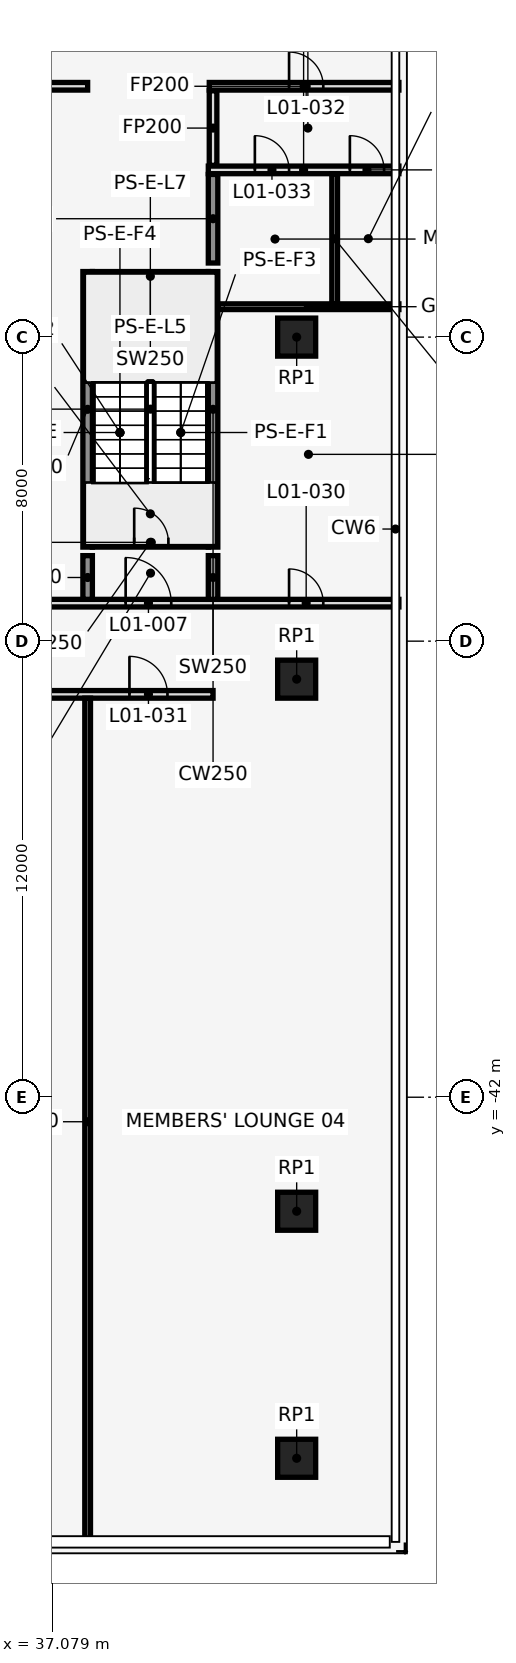
"""IFC4 building model, lengths in metres.
Left out: names, types, materials, properties, quantities, classifications, styles, units other than length and angle.
Written with IfcOpenShell. Run it as: python <this file> out.ifc"""

import sys

from ifc_helpers import new_model, si_unit, direction, frame, frame_2d, origin, origin_2d, place, context, subcontext, project, spatial, rectangle, extrude, element, fill, save


model = new_model("IFC4")
c1 = context("Model", 3, precision=1e-05, world=origin(), true_north=direction((0.0, 1.0)))
c2 = subcontext(c1, "Body", "Model", "MODEL_VIEW")
j1 = project(units=[si_unit("LENGTHUNIT", "METRE"), si_unit("PLANEANGLEUNIT", "RADIAN")], contexts=[c1])
p1 = place(None, origin())
s1 = spatial("IfcSite", under=j1, at=p1, CompositionType="ELEMENT")
p2 = place(p1, origin())
s2 = spatial("IfcBuilding", under=s1, at=p2, CompositionType="ELEMENT")
p3 = place(p2, frame((0.0, 0.0, 8.0)))
s3 = spatial("IfcBuildingStorey", under=s2, at=p3, CompositionType="ELEMENT", Elevation=8.0)
for number, where, z_axis, x_axis in (
    (1, (43.5, -22.0, 0.0), (0.0, 0.0, 1.0), (1.0, 0.0, 0.0)),
    (2, (43.5, -31.0, 0.0), (0.0, 0.0, 1.0), (1.0, 0.0, 0.0)),
    (3, (43.5, -45.0, 0.0), (0.0, 0.0, 1.0), (1.0, 0.0, 0.0)),
    (4, (43.5, -51.5, 0.0), (0.0, 0.0, 1.0), (1.0, 0.0, 0.0)),
):
    element("IfcColumn", number, at=place(p3, frame(where, z_axis=z_axis, x_axis=x_axis)), inside=s3, PredefinedType="COLUMN", context=c2, shape_type="SweptSolid", body=[
        extrude(rectangle(XDim=1.0, YDim=1.0, at=origin_2d()), origin(), (0.0, 0.0, 1.0), 6.0),
    ])
for number, where, z_axis, x_axis in (
    (5, (38.0, -27.525, 0.0), (0.0, 0.0, 1.0), (0.0, 1.0, 0.0)),
    (6, (41.3, -27.525, 0.0), (0.0, 0.0, 1.0), (0.0, 1.0, 0.0)),
):
    element("IfcWall", number, at=place(p3, frame(where, z_axis=z_axis, x_axis=x_axis)), inside=s3, PredefinedType="SHEAR", context=c2, shape_type="SweptSolid", body=[
        extrude(rectangle(XDim=7.25, YDim=0.25, at=frame_2d((3.625, 0.0))), origin(), (0.0, 0.0, 1.0), 6.0),
    ])
p4 = place(p3, frame((38.125, -27.4, 0.0), z_axis=(0.0, 0.0, 1.0), x_axis=(1.0, 0.0, 0.0)))
e7 = element("IfcWall", 7, at=p4, inside=s3, PredefinedType="SHEAR", context=c2, shape_type="SweptSolid", body=[
    extrude(rectangle(XDim=3.05, YDim=0.25, at=frame_2d((1.525, 0.0))), origin(), (0.0, 0.0, 1.0), 6.0),
])
p5 = place(p4, frame((1.1, 0.0, 0.0)))
e8 = element("IfcOpeningElement", 8, at=p5, cuts=e7, PredefinedType="OPENING", context=c2, shape_type="SweptSolid", body=[
    extrude(rectangle(XDim=0.9, YDim=2.1, at=frame_2d((0.45, 1.05))), frame((0.0, 0.137, 0.0), z_axis=(0.0, -1.0, 0.0), x_axis=(1.0, 0.0, 0.0)), (0.0, 0.0, 1.0), 0.274),
])
p6 = place(p3, frame((38.125, -20.4, 0.0), z_axis=(0.0, 0.0, 1.0), x_axis=(1.0, 0.0, 0.0)))
e9 = element("IfcWall", 9, at=p6, inside=s3, PredefinedType="SHEAR", context=c2, shape_type="SweptSolid", body=[
    extrude(rectangle(XDim=3.05, YDim=0.25, at=frame_2d((1.525, 0.0))), origin(), (0.0, 0.0, 1.0), 6.0),
])
p7 = place(p3, frame((19.6, -31.4, 0.0), z_axis=(0.0, 0.0, 1.0), x_axis=(1.0, 0.0, 0.0)))
e10 = element("IfcWall", 10, at=p7, inside=s3, PredefinedType="PARTITIONING", context=c2, shape_type="SweptSolid", body=[
    extrude(rectangle(XDim=21.7, YDim=0.2, at=frame_2d((10.85, 0.0))), origin(), (0.0, 0.0, 1.0), 5.7),
])
p8 = place(p7, frame((1.3, 0.0, 0.0)))
e11 = element("IfcOpeningElement", 11, at=p8, cuts=e10, PredefinedType="OPENING", context=c2, shape_type="SweptSolid", body=[
    extrude(rectangle(XDim=1.0, YDim=2.1, at=frame_2d((0.5, 1.05))), frame((0.0, 0.112, 0.0), z_axis=(0.0, -1.0, 0.0), x_axis=(1.0, 0.0, 0.0)), (0.0, 0.0, 1.0), 0.224),
])
p9 = place(p7, frame((10.4, 0.0, 0.0)))
e12 = element("IfcOpeningElement", 12, at=p9, cuts=e10, PredefinedType="OPENING", context=c2, shape_type="SweptSolid", body=[
    extrude(rectangle(XDim=1.0, YDim=2.1, at=frame_2d((0.5, 1.05))), frame((0.0, 0.112, 0.0), z_axis=(0.0, -1.0, 0.0), x_axis=(1.0, 0.0, 0.0)), (0.0, 0.0, 1.0), 0.224),
])
p10 = place(p7, frame((19.5, 0.0, 0.0)))
e13 = element("IfcOpeningElement", 13, at=p10, cuts=e10, PredefinedType="OPENING", context=c2, shape_type="SweptSolid", body=[
    extrude(rectangle(XDim=1.0, YDim=2.1, at=frame_2d((0.5, 1.05))), frame((0.0, 0.112, 0.0), z_axis=(0.0, -1.0, 0.0), x_axis=(1.0, 0.0, 0.0)), (0.0, 0.0, 1.0), 0.224),
])
p11 = place(p3, frame((19.575, -29.0, 0.0), z_axis=(0.0, 0.0, 1.0), x_axis=(1.0, 0.0, 0.0)))
e14 = element("IfcWall", 14, at=p11, inside=s3, PredefinedType="PARTITIONING", context=c2, shape_type="SweptSolid", body=[
    extrude(rectangle(XDim=26.615, YDim=0.2, at=frame_2d((13.308, 0.0))), origin(), (0.0, 0.0, 1.0), 5.7),
])
p12 = place(p11, frame((1.225, 0.0, 0.0)))
e15 = element("IfcOpeningElement", 15, at=p12, cuts=e14, PredefinedType="OPENING", context=c2, shape_type="SweptSolid", body=[
    extrude(rectangle(XDim=1.2, YDim=2.1, at=frame_2d((0.6, 1.05))), frame((0.0, 0.112, 0.0), z_axis=(0.0, -1.0, 0.0), x_axis=(1.0, 0.0, 0.0)), (0.0, 0.0, 1.0), 0.224),
])
p13 = place(p11, frame((19.425, 0.0, 0.0)))
e16 = element("IfcOpeningElement", 16, at=p13, cuts=e14, PredefinedType="OPENING", context=c2, shape_type="SweptSolid", body=[
    extrude(rectangle(XDim=1.2, YDim=2.1, at=frame_2d((0.6, 1.05))), frame((0.0, 0.112, 0.0), z_axis=(0.0, -1.0, 0.0), x_axis=(1.0, 0.0, 0.0)), (0.0, 0.0, 1.0), 0.224),
])
p14 = place(p11, frame((23.725, 0.0, 0.0)))
e17 = element("IfcOpeningElement", 17, at=p14, cuts=e14, PredefinedType="OPENING", context=c2, shape_type="SweptSolid", body=[
    extrude(rectangle(XDim=0.9, YDim=2.1, at=frame_2d((0.45, 1.05))), frame((0.0, 0.112, 0.0), z_axis=(0.0, -1.0, 0.0), x_axis=(1.0, 0.0, 0.0)), (0.0, 0.0, 1.0), 0.224),
])
p15 = place(p3, frame((41.425, -21.2, 0.0), z_axis=(0.0, 0.0, 1.0), x_axis=(1.0, 0.0, 0.0)))
e18 = element("IfcWall", 18, at=p15, inside=s3, PredefinedType="PARTITIONING", context=c2, shape_type="SweptSolid", body=[
    extrude(rectangle(XDim=4.765, YDim=0.15, at=frame_2d((2.382, 0.0))), origin(), (0.0, 0.0, 1.0), 5.7),
])
p16 = place(p3, frame((41.175, -17.6, 0.0), z_axis=(0.0, 0.0, 1.0), x_axis=(1.0, 0.0, 0.0)))
e19 = element("IfcWall", 19, at=p16, inside=s3, PredefinedType="PARTITIONING", context=c2, shape_type="SweptSolid", body=[
    extrude(rectangle(XDim=5.015, YDim=0.2, at=frame_2d((2.507, 0.0))), origin(), (0.0, 0.0, 1.0), 5.7),
])
p17 = place(p16, frame((1.225, 0.0, 0.0)))
e20 = element("IfcOpeningElement", 20, at=p17, cuts=e19, PredefinedType="OPENING", context=c2, shape_type="SweptSolid", body=[
    extrude(rectangle(XDim=0.9, YDim=2.1, at=frame_2d((0.45, 1.05))), frame((0.0, 0.112, 0.0), z_axis=(0.0, -1.0, 0.0), x_axis=(1.0, 0.0, 0.0)), (0.0, 0.0, 1.0), 0.224),
])
p18 = place(p16, frame((3.725, 0.0, 0.0)))
e21 = element("IfcOpeningElement", 21, at=p18, cuts=e19, PredefinedType="OPENING", context=c2, shape_type="SweptSolid", body=[
    extrude(rectangle(XDim=0.9, YDim=2.1, at=frame_2d((0.45, 1.05))), frame((0.0, 0.112, 0.0), z_axis=(0.0, -1.0, 0.0), x_axis=(1.0, 0.0, 0.0)), (0.0, 0.0, 1.0), 0.224),
])
p19 = place(p3, frame((19.575, -15.4, 0.0), z_axis=(0.0, 0.0, 1.0), x_axis=(1.0, 0.0, 0.0)))
e22 = element("IfcWall", 22, at=p19, inside=s3, PredefinedType="PARTITIONING", context=c2, shape_type="SweptSolid", body=[
    extrude(rectangle(XDim=18.425, YDim=0.2, at=frame_2d((9.212, 0.0))), origin(), (0.0, 0.0, 1.0), 5.7),
])
p20 = place(p19, frame((1.325, 0.0, 0.0)))
e23 = element("IfcOpeningElement", 23, at=p20, cuts=e22, PredefinedType="OPENING", context=c2, shape_type="SweptSolid", body=[
    extrude(rectangle(XDim=0.9, YDim=2.1, at=frame_2d((0.45, 1.05))), frame((0.0, 0.112, 0.0), z_axis=(0.0, -1.0, 0.0), x_axis=(1.0, 0.0, 0.0)), (0.0, 0.0, 1.0), 0.224),
])
p21 = place(p19, frame((10.025, 0.0, 0.0)))
e24 = element("IfcOpeningElement", 24, at=p21, cuts=e22, PredefinedType="OPENING", context=c2, shape_type="SweptSolid", body=[
    extrude(rectangle(XDim=1.8, YDim=2.1, at=frame_2d((0.9, 1.05))), frame((0.0, 0.112, 0.0), z_axis=(0.0, -1.0, 0.0), x_axis=(1.0, 0.0, 0.0)), (0.0, 0.0, 1.0), 0.224),
])
p22 = place(p3, frame((41.2, -15.4, 0.0), z_axis=(0.0, 0.0, 1.0), x_axis=(1.0, 0.0, 0.0)))
e25 = element("IfcWall", 25, at=p22, inside=s3, PredefinedType="PARTITIONING", context=c2, shape_type="SweptSolid", body=[
    extrude(rectangle(XDim=4.99, YDim=0.2, at=frame_2d((2.495, 0.0))), origin(), (0.0, 0.0, 1.0), 5.7),
])
p23 = place(p22, frame((2.1, 0.0, 0.0)))
e26 = element("IfcOpeningElement", 26, at=p23, cuts=e25, PredefinedType="OPENING", context=c2, shape_type="SweptSolid", body=[
    extrude(rectangle(XDim=0.9, YDim=2.1, at=frame_2d((0.45, 1.05))), frame((0.0, 0.112, 0.0), z_axis=(0.0, -1.0, 0.0), x_axis=(1.0, 0.0, 0.0)), (0.0, 0.0, 1.0), 0.224),
])
p24 = place(p3, frame((38.0, -53.79, 0.0), z_axis=(0.0, 0.0, 1.0), x_axis=(0.0, 1.0, 0.0)))
e27 = element("IfcWall", 27, at=p24, inside=s3, PredefinedType="PARTITIONING", context=c2, shape_type="SweptSolid", body=[
    extrude(rectangle(XDim=22.29, YDim=0.15, at=frame_2d((11.145, 0.0))), origin(), (0.0, 0.0, 1.0), 5.7),
])
for number, where, z_axis, x_axis in (
    (28, (38.0, -28.9, 0.0), (0.0, 0.0, 1.0), (0.0, 1.0, 0.0)),
    (29, (41.3, -28.9, 0.0), (0.0, 0.0, 1.0), (0.0, 1.0, 0.0)),
):
    element("IfcWall", number, at=place(p3, frame(where, z_axis=z_axis, x_axis=x_axis)), inside=s3, PredefinedType="SHEAR", context=c2, shape_type="SweptSolid", body=[
        extrude(rectangle(XDim=1.15, YDim=0.25, at=frame_2d((0.575, 0.0))), origin(), (0.0, 0.0, 1.0), 6.0),
    ])
p25 = place(p3, frame((41.3, -20.05, 0.0), z_axis=(0.0, 0.0, 1.0), x_axis=(0.0, 1.0, 0.0)))
e30 = element("IfcWall", 30, at=p25, inside=s3, PredefinedType="SHEAR", context=c2, shape_type="SweptSolid", body=[
    extrude(rectangle(XDim=2.33, YDim=0.25, at=frame_2d((1.165, 0.0))), origin(), (0.0, 0.0, 1.0), 6.0),
])
p26 = place(p3, frame((41.3, -17.48, 0.0), z_axis=(0.0, 0.0, 1.0), x_axis=(0.0, 1.0, 0.0)))
e31 = element("IfcWall", 31, at=p26, inside=s3, PredefinedType="PARTITIONING", context=c2, shape_type="SweptSolid", body=[
    extrude(rectangle(XDim=1.96, YDim=0.2, at=frame_2d((0.98, 0.0))), origin(), (0.0, 0.0, 1.0), 5.7),
])
p27 = place(p3, frame((44.5, -21.125, 0.0), z_axis=(0.0, 0.0, 1.0), x_axis=(0.0, 1.0, 0.0)))
e32 = element("IfcWall", 32, at=p27, inside=s3, PredefinedType="PARTITIONING", context=c2, shape_type="SweptSolid", body=[
    extrude(rectangle(XDim=3.425, YDim=0.15, at=frame_2d((1.712, 0.0))), origin(), (0.0, 0.0, 1.0), 5.7),
])
p28 = place(p13, origin())
e33 = element("IfcDoor", 33, at=p28, inside=s3, OperationType="SINGLE_SWING_LEFT", PredefinedType="DOOR", context=c2, shape_type="SweptSolid", body=[
    extrude(rectangle(XDim=1.2, YDim=2.1, at=frame_2d((0.6, 1.05))), frame((0.0, 0.025, 0.0), z_axis=(0.0, -1.0, 0.0), x_axis=(1.0, 0.0, 0.0)), (0.0, 0.0, 1.0), 0.05),
])
fill(e16, e33)
p29 = place(p5, origin())
e34 = element("IfcDoor", 34, at=p29, inside=s3, OperationType="SINGLE_SWING_LEFT", PredefinedType="DOOR", context=c2, shape_type="SweptSolid", body=[
    extrude(rectangle(XDim=0.9, YDim=2.1, at=frame_2d((0.45, 1.05))), frame((0.0, 0.025, 0.0), z_axis=(0.0, -1.0, 0.0), x_axis=(1.0, 0.0, 0.0)), (0.0, 0.0, 1.0), 0.05),
])
fill(e8, e34)
p30 = place(p14, origin())
e35 = element("IfcDoor", 35, at=p30, inside=s3, OperationType="SINGLE_SWING_RIGHT", PredefinedType="DOOR", context=c2, shape_type="SweptSolid", body=[
    extrude(rectangle(XDim=0.9, YDim=2.1, at=frame_2d((0.45, 1.05))), frame((0.0, 0.025, 0.0), z_axis=(0.0, -1.0, 0.0), x_axis=(1.0, 0.0, 0.0)), (0.0, 0.0, 1.0), 0.05),
])
fill(e17, e35)
p31 = place(p10, frame((1.0, 0.0, 0.0), z_axis=(0.0, 0.0, 1.0), x_axis=(-1.0, 0.0, 0.0)))
e36 = element("IfcDoor", 36, at=p31, inside=s3, OperationType="SINGLE_SWING_LEFT", PredefinedType="DOOR", context=c2, shape_type="SweptSolid", body=[
    extrude(rectangle(XDim=1.0, YDim=2.1, at=frame_2d((0.5, 1.05))), frame((0.0, 0.025, 0.0), z_axis=(0.0, -1.0, 0.0), x_axis=(1.0, 0.0, 0.0)), (0.0, 0.0, 1.0), 0.05),
])
fill(e13, e36)
p32 = place(p23, frame((0.9, 0.0, 0.0), z_axis=(0.0, 0.0, 1.0), x_axis=(-1.0, 0.0, 0.0)))
e37 = element("IfcDoor", 37, at=p32, inside=s3, OperationType="SINGLE_SWING_RIGHT", PredefinedType="DOOR", context=c2, shape_type="SweptSolid", body=[
    extrude(rectangle(XDim=0.9, YDim=2.1, at=frame_2d((0.45, 1.05))), frame((0.0, 0.025, 0.0), z_axis=(0.0, -1.0, 0.0), x_axis=(1.0, 0.0, 0.0)), (0.0, 0.0, 1.0), 0.05),
])
fill(e26, e37)
p33 = place(p17, frame((0.9, 0.0, 0.0), z_axis=(0.0, 0.0, 1.0), x_axis=(-1.0, 0.0, 0.0)))
e38 = element("IfcDoor", 38, at=p33, inside=s3, OperationType="SINGLE_SWING_RIGHT", PredefinedType="DOOR", context=c2, shape_type="SweptSolid", body=[
    extrude(rectangle(XDim=0.9, YDim=2.1, at=frame_2d((0.45, 1.05))), frame((0.0, 0.025, 0.0), z_axis=(0.0, -1.0, 0.0), x_axis=(1.0, 0.0, 0.0)), (0.0, 0.0, 1.0), 0.05),
])
fill(e20, e38)
p34 = place(p18, frame((0.9, 0.0, 0.0), z_axis=(0.0, 0.0, 1.0), x_axis=(-1.0, 0.0, 0.0)))
e39 = element("IfcDoor", 39, at=p34, inside=s3, OperationType="SINGLE_SWING_LEFT", PredefinedType="DOOR", context=c2, shape_type="SweptSolid", body=[
    extrude(rectangle(XDim=0.9, YDim=2.1, at=frame_2d((0.45, 1.05))), frame((0.0, 0.025, 0.0), z_axis=(0.0, -1.0, 0.0), x_axis=(1.0, 0.0, 0.0)), (0.0, 0.0, 1.0), 0.05),
])
fill(e21, e39)
save(model, sys.argv[1])
